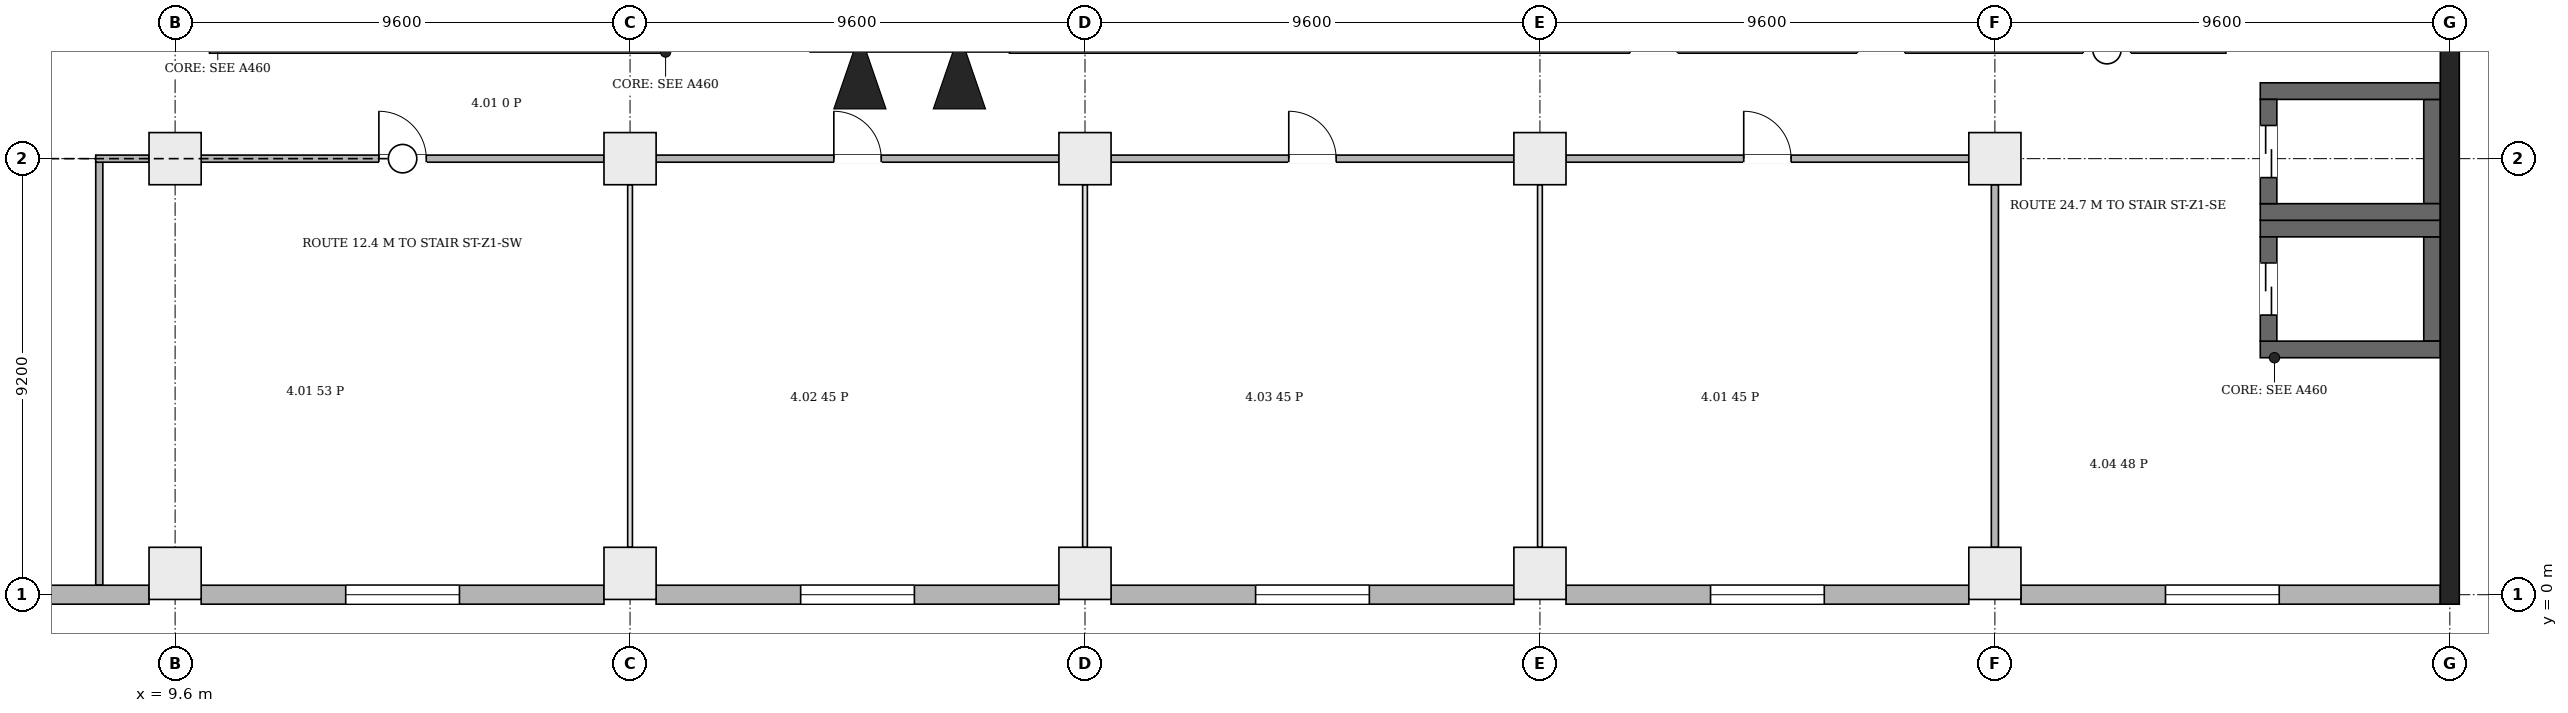
"""IFC4 building model, lengths in metres.
Left out: names, types, materials, properties, quantities, classifications, styles, units other than length and angle.
Written with IfcOpenShell. Run it as: python <this file> out.ifc"""

import sys

from ifc_helpers import new_model, si_unit, direction, frame, frame_2d, origin, origin_2d, place, context, subcontext, project, spatial, rectangle, extrude, element, fill, save


model = new_model("IFC4")
c1 = context("Model", 3, precision=1e-05, world=origin(), true_north=direction((0.0, 1.0)))
c2 = subcontext(c1, "Body", "Model", "MODEL_VIEW")
j1 = project(units=[si_unit("LENGTHUNIT", "METRE"), si_unit("PLANEANGLEUNIT", "RADIAN")], contexts=[c1])
p1 = place(None, origin())
s1 = spatial("IfcSite", under=j1, at=p1, CompositionType="ELEMENT")
p2 = place(p1, origin())
s2 = spatial("IfcBuilding", under=s1, at=p2, CompositionType="ELEMENT")
p3 = place(p2, frame((0.0, 0.0, 26.7)))
s3 = spatial("IfcBuildingStorey", under=s2, at=p3, CompositionType="ELEMENT", Elevation=26.7)
p4 = place(p3, frame((57.6, -0.2, 0.0), z_axis=(0.0, 0.0, 1.0), x_axis=(0.0, 1.0, 0.0)))
e1 = element("IfcWall", 1, at=p4, inside=s3, PredefinedType="SHEAR", context=c2, shape_type="SweptSolid", body=[
    extrude(rectangle(XDim=46.88, YDim=0.4, at=frame_2d((23.44, 0.0))), origin(), (0.0, 0.0, 1.0), 5.2),
])
for number, where, z_axis, x_axis in (
    (2, (53.6, 5.175, 0.0), (0.0, 0.0, 1.0), (1.0, 0.0, 0.0)),
    (3, (53.6, 7.725, 0.0), (0.0, 0.0, 1.0), (1.0, 0.0, 0.0)),
):
    element("IfcWall", number, at=place(p3, frame(where, z_axis=z_axis, x_axis=x_axis)), inside=s3, PredefinedType="SHEAR", context=c2, shape_type="SweptSolid", body=[
        extrude(rectangle(XDim=3.8, YDim=0.35, at=frame_2d((1.9, 0.0))), origin(), (0.0, 0.0, 1.0), 5.2),
    ])
p5 = place(p3, frame((53.775, 5.35, 0.0), z_axis=(0.0, 0.0, 1.0), x_axis=(0.0, 1.0, 0.0)))
e4 = element("IfcWall", 4, at=p5, inside=s3, PredefinedType="SHEAR", context=c2, shape_type="SweptSolid", body=[
    extrude(rectangle(XDim=2.2, YDim=0.35, at=frame_2d((1.1, 0.0))), origin(), (0.0, 0.0, 1.0), 5.2),
])
p6 = place(p5, frame((0.55, 0.0, 0.0)))
e5 = element("IfcOpeningElement", 5, at=p6, cuts=e4, PredefinedType="OPENING", context=c2, shape_type="SweptSolid", body=[
    extrude(rectangle(XDim=1.1, YDim=2.1, at=frame_2d((0.55, 1.05))), frame((0.0, 0.185, 0.0), z_axis=(0.0, -1.0, 0.0), x_axis=(1.0, 0.0, 0.0)), (0.0, 0.0, 1.0), 0.37),
])
p7 = place(p3, frame((57.225, 5.35, 0.0), z_axis=(0.0, 0.0, 1.0), x_axis=(0.0, 1.0, 0.0)))
e6 = element("IfcWall", 6, at=p7, inside=s3, PredefinedType="SHEAR", context=c2, shape_type="SweptSolid", body=[
    extrude(rectangle(XDim=2.2, YDim=0.35, at=frame_2d((1.1, 0.0))), origin(), (0.0, 0.0, 1.0), 5.2),
])
for number, where, z_axis, x_axis in (
    (7, (53.6, 8.075, 0.0), (0.0, 0.0, 1.0), (1.0, 0.0, 0.0)),
    (8, (53.6, 10.625, 0.0), (0.0, 0.0, 1.0), (1.0, 0.0, 0.0)),
):
    element("IfcWall", number, at=place(p3, frame(where, z_axis=z_axis, x_axis=x_axis)), inside=s3, PredefinedType="SHEAR", context=c2, shape_type="SweptSolid", body=[
        extrude(rectangle(XDim=3.8, YDim=0.35, at=frame_2d((1.9, 0.0))), origin(), (0.0, 0.0, 1.0), 5.2),
    ])
p8 = place(p3, frame((53.775, 8.25, 0.0), z_axis=(0.0, 0.0, 1.0), x_axis=(0.0, 1.0, 0.0)))
e9 = element("IfcWall", 9, at=p8, inside=s3, PredefinedType="SHEAR", context=c2, shape_type="SweptSolid", body=[
    extrude(rectangle(XDim=2.2, YDim=0.35, at=frame_2d((1.1, 0.0))), origin(), (0.0, 0.0, 1.0), 5.2),
])
p9 = place(p8, frame((0.55, 0.0, 0.0)))
e10 = element("IfcOpeningElement", 10, at=p9, cuts=e9, PredefinedType="OPENING", context=c2, shape_type="SweptSolid", body=[
    extrude(rectangle(XDim=1.1, YDim=2.1, at=frame_2d((0.55, 1.05))), frame((0.0, 0.185, 0.0), z_axis=(0.0, -1.0, 0.0), x_axis=(1.0, 0.0, 0.0)), (0.0, 0.0, 1.0), 0.37),
])
p10 = place(p3, frame((57.225, 8.25, 0.0), z_axis=(0.0, 0.0, 1.0), x_axis=(0.0, 1.0, 0.0)))
e11 = element("IfcWall", 11, at=p10, inside=s3, PredefinedType="SHEAR", context=c2, shape_type="SweptSolid", body=[
    extrude(rectangle(XDim=2.2, YDim=0.35, at=frame_2d((1.1, 0.0))), origin(), (0.0, 0.0, 1.0), 5.2),
])
for number, where, z_axis, x_axis in (
    (12, (9.6, 0.45, 0.0), (0.0, 0.0, 1.0), (1.0, 0.0, 0.0)),
    (13, (19.2, 0.45, 0.0), (0.0, 0.0, 1.0), (1.0, 0.0, 0.0)),
    (14, (28.8, 0.45, 0.0), (0.0, 0.0, 1.0), (1.0, 0.0, 0.0)),
    (15, (38.4, 0.45, 0.0), (0.0, 0.0, 1.0), (1.0, 0.0, 0.0)),
    (16, (48.0, 0.45, 0.0), (0.0, 0.0, 1.0), (1.0, 0.0, 0.0)),
    (17, (9.6, 9.2, 0.0), (0.0, 0.0, 1.0), (1.0, 0.0, 0.0)),
    (18, (19.2, 9.2, 0.0), (0.0, 0.0, 1.0), (1.0, 0.0, 0.0)),
    (19, (28.8, 9.2, 0.0), (0.0, 0.0, 1.0), (1.0, 0.0, 0.0)),
    (20, (38.4, 9.2, 0.0), (0.0, 0.0, 1.0), (1.0, 0.0, 0.0)),
    (21, (48.0, 9.2, 0.0), (0.0, 0.0, 1.0), (1.0, 0.0, 0.0)),
):
    element("IfcColumn", number, at=place(p3, frame(where, z_axis=z_axis, x_axis=x_axis)), inside=s3, PredefinedType="COLUMN", context=c2, shape_type="SweptSolid", body=[
        extrude(rectangle(XDim=1.1, YDim=1.1, at=origin_2d()), origin(), (0.0, 0.0, 1.0), 5.2),
    ])
p11 = place(p3, frame((0.2, 0.0, 0.0), z_axis=(0.0, 0.0, 1.0), x_axis=(1.0, 0.0, 0.0)))
e22 = element("IfcWall", 22, at=p11, inside=s3, PredefinedType="ELEMENTEDWALL", context=c2, shape_type="SweptSolid", body=[
    extrude(rectangle(XDim=8.85, YDim=0.4, at=frame_2d((4.425, 0.0))), origin(), (0.0, 0.0, 1.0), 4.85),
])
p12 = place(p11, frame((3.4, 0.0, 1.0)))
e23 = element("IfcOpeningElement", 23, at=p12, cuts=e22, PredefinedType="OPENING", context=c2, shape_type="SweptSolid", body=[
    extrude(rectangle(XDim=2.4, YDim=2.2, at=frame_2d((1.2, 1.1))), frame((0.0, 0.21, 0.0), z_axis=(0.0, -1.0, 0.0), x_axis=(1.0, 0.0, 0.0)), (0.0, 0.0, 1.0), 0.42),
])
p13 = place(p3, frame((10.15, 0.0, 0.0), z_axis=(0.0, 0.0, 1.0), x_axis=(1.0, 0.0, 0.0)))
e24 = element("IfcWall", 24, at=p13, inside=s3, PredefinedType="ELEMENTEDWALL", context=c2, shape_type="SweptSolid", body=[
    extrude(rectangle(XDim=8.5, YDim=0.4, at=frame_2d((4.25, 0.0))), origin(), (0.0, 0.0, 1.0), 4.85),
])
p14 = place(p13, frame((3.05, 0.0, 1.0)))
e25 = element("IfcOpeningElement", 25, at=p14, cuts=e24, PredefinedType="OPENING", context=c2, shape_type="SweptSolid", body=[
    extrude(rectangle(XDim=2.4, YDim=2.2, at=frame_2d((1.2, 1.1))), frame((0.0, 0.21, 0.0), z_axis=(0.0, -1.0, 0.0), x_axis=(1.0, 0.0, 0.0)), (0.0, 0.0, 1.0), 0.42),
])
p15 = place(p3, frame((19.75, 0.0, 0.0), z_axis=(0.0, 0.0, 1.0), x_axis=(1.0, 0.0, 0.0)))
e26 = element("IfcWall", 26, at=p15, inside=s3, PredefinedType="ELEMENTEDWALL", context=c2, shape_type="SweptSolid", body=[
    extrude(rectangle(XDim=8.5, YDim=0.4, at=frame_2d((4.25, 0.0))), origin(), (0.0, 0.0, 1.0), 4.85),
])
p16 = place(p15, frame((3.05, 0.0, 1.0)))
e27 = element("IfcOpeningElement", 27, at=p16, cuts=e26, PredefinedType="OPENING", context=c2, shape_type="SweptSolid", body=[
    extrude(rectangle(XDim=2.4, YDim=2.2, at=frame_2d((1.2, 1.1))), frame((0.0, 0.21, 0.0), z_axis=(0.0, -1.0, 0.0), x_axis=(1.0, 0.0, 0.0)), (0.0, 0.0, 1.0), 0.42),
])
p17 = place(p3, frame((29.35, 0.0, 0.0), z_axis=(0.0, 0.0, 1.0), x_axis=(1.0, 0.0, 0.0)))
e28 = element("IfcWall", 28, at=p17, inside=s3, PredefinedType="ELEMENTEDWALL", context=c2, shape_type="SweptSolid", body=[
    extrude(rectangle(XDim=8.5, YDim=0.4, at=frame_2d((4.25, 0.0))), origin(), (0.0, 0.0, 1.0), 4.85),
])
p18 = place(p17, frame((3.05, 0.0, 1.0)))
e29 = element("IfcOpeningElement", 29, at=p18, cuts=e28, PredefinedType="OPENING", context=c2, shape_type="SweptSolid", body=[
    extrude(rectangle(XDim=2.4, YDim=2.2, at=frame_2d((1.2, 1.1))), frame((0.0, 0.21, 0.0), z_axis=(0.0, -1.0, 0.0), x_axis=(1.0, 0.0, 0.0)), (0.0, 0.0, 1.0), 0.42),
])
p19 = place(p3, frame((38.95, 0.0, 0.0), z_axis=(0.0, 0.0, 1.0), x_axis=(1.0, 0.0, 0.0)))
e30 = element("IfcWall", 30, at=p19, inside=s3, PredefinedType="ELEMENTEDWALL", context=c2, shape_type="SweptSolid", body=[
    extrude(rectangle(XDim=8.5, YDim=0.4, at=frame_2d((4.25, 0.0))), origin(), (0.0, 0.0, 1.0), 4.85),
])
p20 = place(p19, frame((3.05, 0.0, 1.0)))
e31 = element("IfcOpeningElement", 31, at=p20, cuts=e30, PredefinedType="OPENING", context=c2, shape_type="SweptSolid", body=[
    extrude(rectangle(XDim=2.4, YDim=2.2, at=frame_2d((1.2, 1.1))), frame((0.0, 0.21, 0.0), z_axis=(0.0, -1.0, 0.0), x_axis=(1.0, 0.0, 0.0)), (0.0, 0.0, 1.0), 0.42),
])
p21 = place(p3, frame((48.55, 0.0, 0.0), z_axis=(0.0, 0.0, 1.0), x_axis=(1.0, 0.0, 0.0)))
e32 = element("IfcWall", 32, at=p21, inside=s3, PredefinedType="ELEMENTEDWALL", context=c2, shape_type="SweptSolid", body=[
    extrude(rectangle(XDim=8.85, YDim=0.4, at=frame_2d((4.425, 0.0))), origin(), (0.0, 0.0, 1.0), 4.85),
])
p22 = place(p21, frame((3.05, 0.0, 1.0)))
e33 = element("IfcOpeningElement", 33, at=p22, cuts=e32, PredefinedType="OPENING", context=c2, shape_type="SweptSolid", body=[
    extrude(rectangle(XDim=2.4, YDim=2.2, at=frame_2d((1.2, 1.1))), frame((0.0, 0.21, 0.0), z_axis=(0.0, -1.0, 0.0), x_axis=(1.0, 0.0, 0.0)), (0.0, 0.0, 1.0), 0.42),
])
p23 = place(p3, frame((8.0, 0.206, 0.0), z_axis=(0.0, 0.0, 1.0), x_axis=(0.0, 1.0, 0.0)))
e34 = element("IfcWall", 34, at=p23, inside=s3, PredefinedType="PARTITIONING", context=c2, shape_type="SweptSolid", body=[
    extrude(rectangle(XDim=8.919, YDim=0.15, at=frame_2d((4.459, 0.0))), origin(), (0.0, 0.0, 1.0), 4.85),
])
p24 = place(p3, frame((7.925, 9.2, 0.0), z_axis=(0.0, 0.0, 1.0), x_axis=(1.0, 0.0, 0.0)))
e35 = element("IfcWall", 35, at=p24, inside=s3, PredefinedType="PARTITIONING", context=c2, shape_type="SweptSolid", body=[
    extrude(rectangle(XDim=1.125, YDim=0.15, at=frame_2d((0.562, 0.0))), origin(), (0.0, 0.0, 1.0), 4.45),
])
p25 = place(p3, frame((10.15, 9.2, 0.0), z_axis=(0.0, 0.0, 1.0), x_axis=(1.0, 0.0, 0.0)))
e36 = element("IfcWall", 36, at=p25, inside=s3, PredefinedType="PARTITIONING", context=c2, shape_type="SweptSolid", body=[
    extrude(rectangle(XDim=8.5, YDim=0.15, at=frame_2d((4.25, 0.0))), origin(), (0.0, 0.0, 1.0), 4.45),
])
p26 = place(p25, frame((3.75, 0.0, 0.0)))
e37 = element("IfcOpeningElement", 37, at=p26, cuts=e36, PredefinedType="OPENING", context=c2, shape_type="SweptSolid", body=[
    extrude(rectangle(XDim=1.0, YDim=2.1, at=frame_2d((0.5, 1.05))), frame((0.0, 0.085, 0.0), z_axis=(0.0, -1.0, 0.0), x_axis=(1.0, 0.0, 0.0)), (0.0, 0.0, 1.0), 0.17),
])
p27 = place(p3, frame((10.325, 11.5, 0.0), z_axis=(0.0, 0.0, 1.0), x_axis=(1.0, 0.0, 0.0)))
e38 = element("IfcWall", 38, at=p27, inside=s3, PredefinedType="PARTITIONING", context=c2, shape_type="SweptSolid", body=[
    extrude(rectangle(XDim=9.569, YDim=0.15, at=frame_2d((4.785, 0.0))), origin(), (0.0, 0.0, 1.0), 4.85),
])
p28 = place(p3, frame((19.2, 1.0, 0.0), z_axis=(0.0, 0.0, 1.0), x_axis=(0.0, 1.0, 0.0)))
e39 = element("IfcWall", 39, at=p28, inside=s3, PredefinedType="PARTITIONING", context=c2, shape_type="SweptSolid", body=[
    extrude(rectangle(XDim=7.65, YDim=0.1, at=frame_2d((3.825, 0.0))), origin(), (0.0, 0.0, 1.0), 4.45),
])
p29 = place(p3, frame((19.75, 9.2, 0.0), z_axis=(0.0, 0.0, 1.0), x_axis=(1.0, 0.0, 0.0)))
e40 = element("IfcWall", 40, at=p29, inside=s3, PredefinedType="PARTITIONING", context=c2, shape_type="SweptSolid", body=[
    extrude(rectangle(XDim=8.5, YDim=0.15, at=frame_2d((4.25, 0.0))), origin(), (0.0, 0.0, 1.0), 4.45),
])
p30 = place(p29, frame((3.75, 0.0, 0.0)))
e41 = element("IfcOpeningElement", 41, at=p30, cuts=e40, PredefinedType="OPENING", context=c2, shape_type="SweptSolid", body=[
    extrude(rectangle(XDim=1.0, YDim=2.1, at=frame_2d((0.5, 1.05))), frame((0.0, 0.085, 0.0), z_axis=(0.0, -1.0, 0.0), x_axis=(1.0, 0.0, 0.0)), (0.0, 0.0, 1.0), 0.17),
])
p31 = place(p3, frame((27.206, 11.5, 0.0), z_axis=(0.0, 0.0, 1.0), x_axis=(1.0, 0.0, 0.0)))
e42 = element("IfcWall", 42, at=p31, inside=s3, PredefinedType="PARTITIONING", context=c2, shape_type="SweptSolid", body=[
    extrude(rectangle(XDim=25.669, YDim=0.15, at=frame_2d((12.834, 0.0))), origin(), (0.0, 0.0, 1.0), 4.85),
])
p32 = place(p31, frame((13.094, 0.0, 0.0)))
e43 = element("IfcOpeningElement", 43, at=p32, cuts=e42, PredefinedType="OPENING", context=c2, shape_type="SweptSolid", body=[
    extrude(rectangle(XDim=1.0, YDim=2.1, at=frame_2d((0.5, 1.05))), frame((0.0, 0.085, 0.0), z_axis=(0.0, -1.0, 0.0), x_axis=(1.0, 0.0, 0.0)), (0.0, 0.0, 1.0), 0.17),
])
p33 = place(p31, frame((17.894, 0.0, 0.0)))
e44 = element("IfcOpeningElement", 44, at=p33, cuts=e42, PredefinedType="OPENING", context=c2, shape_type="SweptSolid", body=[
    extrude(rectangle(XDim=1.0, YDim=2.1, at=frame_2d((0.5, 1.05))), frame((0.0, 0.085, 0.0), z_axis=(0.0, -1.0, 0.0), x_axis=(1.0, 0.0, 0.0)), (0.0, 0.0, 1.0), 0.17),
])
p34 = place(p31, frame((22.659, 0.0, 0.0)))
e45 = element("IfcOpeningElement", 45, at=p34, cuts=e42, PredefinedType="OPENING", context=c2, shape_type="SweptSolid", body=[
    extrude(rectangle(XDim=1.0, YDim=2.1, at=frame_2d((0.5, 1.05))), frame((0.0, 0.085, 0.0), z_axis=(0.0, -1.0, 0.0), x_axis=(1.0, 0.0, 0.0)), (0.0, 0.0, 1.0), 0.17),
])
p35 = place(p3, frame((28.8, 1.0, 0.0), z_axis=(0.0, 0.0, 1.0), x_axis=(0.0, 1.0, 0.0)))
e46 = element("IfcWall", 46, at=p35, inside=s3, PredefinedType="PARTITIONING", context=c2, shape_type="SweptSolid", body=[
    extrude(rectangle(XDim=7.65, YDim=0.1, at=frame_2d((3.825, 0.0))), origin(), (0.0, 0.0, 1.0), 4.45),
])
p36 = place(p3, frame((29.35, 9.2, 0.0), z_axis=(0.0, 0.0, 1.0), x_axis=(1.0, 0.0, 0.0)))
e47 = element("IfcWall", 47, at=p36, inside=s3, PredefinedType="PARTITIONING", context=c2, shape_type="SweptSolid", body=[
    extrude(rectangle(XDim=8.5, YDim=0.15, at=frame_2d((4.25, 0.0))), origin(), (0.0, 0.0, 1.0), 4.45),
])
p37 = place(p36, frame((3.75, 0.0, 0.0)))
e48 = element("IfcOpeningElement", 48, at=p37, cuts=e47, PredefinedType="OPENING", context=c2, shape_type="SweptSolid", body=[
    extrude(rectangle(XDim=1.0, YDim=2.1, at=frame_2d((0.5, 1.05))), frame((0.0, 0.085, 0.0), z_axis=(0.0, -1.0, 0.0), x_axis=(1.0, 0.0, 0.0)), (0.0, 0.0, 1.0), 0.17),
])
p38 = place(p3, frame((38.4, 1.0, 0.0), z_axis=(0.0, 0.0, 1.0), x_axis=(0.0, 1.0, 0.0)))
e49 = element("IfcWall", 49, at=p38, inside=s3, PredefinedType="PARTITIONING", context=c2, shape_type="SweptSolid", body=[
    extrude(rectangle(XDim=7.65, YDim=0.1, at=frame_2d((3.825, 0.0))), origin(), (0.0, 0.0, 1.0), 4.45),
])
p39 = place(p3, frame((38.95, 9.2, 0.0), z_axis=(0.0, 0.0, 1.0), x_axis=(1.0, 0.0, 0.0)))
e50 = element("IfcWall", 50, at=p39, inside=s3, PredefinedType="PARTITIONING", context=c2, shape_type="SweptSolid", body=[
    extrude(rectangle(XDim=8.5, YDim=0.15, at=frame_2d((4.25, 0.0))), origin(), (0.0, 0.0, 1.0), 4.45),
])
p40 = place(p39, frame((3.75, 0.0, 0.0)))
e51 = element("IfcOpeningElement", 51, at=p40, cuts=e50, PredefinedType="OPENING", context=c2, shape_type="SweptSolid", body=[
    extrude(rectangle(XDim=1.0, YDim=2.1, at=frame_2d((0.5, 1.05))), frame((0.0, 0.085, 0.0), z_axis=(0.0, -1.0, 0.0), x_axis=(1.0, 0.0, 0.0)), (0.0, 0.0, 1.0), 0.17),
])
p41 = place(p3, frame((48.0, 1.0, 0.0), z_axis=(0.0, 0.0, 1.0), x_axis=(0.0, 1.0, 0.0)))
e52 = element("IfcWall", 52, at=p41, inside=s3, PredefinedType="PARTITIONING", context=c2, shape_type="SweptSolid", body=[
    extrude(rectangle(XDim=7.65, YDim=0.15, at=frame_2d((3.825, 0.0))), origin(), (0.0, 0.0, 1.0), 4.85),
])
p42 = place(p14, origin())
e53 = element("IfcWindow", 53, at=p42, inside=s3, PartitioningType="SINGLE_PANEL", PredefinedType="WINDOW", context=c2, shape_type="SweptSolid", body=[
    extrude(rectangle(XDim=2.4, YDim=2.2, at=frame_2d((1.2, 1.1))), frame((0.0, 0.03, 0.0), z_axis=(0.0, -1.0, 0.0), x_axis=(1.0, 0.0, 0.0)), (0.0, 0.0, 1.0), 0.06),
])
fill(e25, e53)
p43 = place(p16, origin())
e54 = element("IfcWindow", 54, at=p43, inside=s3, PartitioningType="SINGLE_PANEL", PredefinedType="WINDOW", context=c2, shape_type="SweptSolid", body=[
    extrude(rectangle(XDim=2.4, YDim=2.2, at=frame_2d((1.2, 1.1))), frame((0.0, 0.03, 0.0), z_axis=(0.0, -1.0, 0.0), x_axis=(1.0, 0.0, 0.0)), (0.0, 0.0, 1.0), 0.06),
])
fill(e27, e54)
p44 = place(p18, origin())
e55 = element("IfcWindow", 55, at=p44, inside=s3, PartitioningType="SINGLE_PANEL", PredefinedType="WINDOW", context=c2, shape_type="SweptSolid", body=[
    extrude(rectangle(XDim=2.4, YDim=2.2, at=frame_2d((1.2, 1.1))), frame((0.0, 0.03, 0.0), z_axis=(0.0, -1.0, 0.0), x_axis=(1.0, 0.0, 0.0)), (0.0, 0.0, 1.0), 0.06),
])
fill(e29, e55)
p45 = place(p20, origin())
e56 = element("IfcWindow", 56, at=p45, inside=s3, PartitioningType="SINGLE_PANEL", PredefinedType="WINDOW", context=c2, shape_type="SweptSolid", body=[
    extrude(rectangle(XDim=2.4, YDim=2.2, at=frame_2d((1.2, 1.1))), frame((0.0, 0.03, 0.0), z_axis=(0.0, -1.0, 0.0), x_axis=(1.0, 0.0, 0.0)), (0.0, 0.0, 1.0), 0.06),
])
fill(e31, e56)
p46 = place(p22, origin())
e57 = element("IfcWindow", 57, at=p46, inside=s3, PartitioningType="SINGLE_PANEL", PredefinedType="WINDOW", context=c2, shape_type="SweptSolid", body=[
    extrude(rectangle(XDim=2.4, YDim=2.2, at=frame_2d((1.2, 1.1))), frame((0.0, 0.03, 0.0), z_axis=(0.0, -1.0, 0.0), x_axis=(1.0, 0.0, 0.0)), (0.0, 0.0, 1.0), 0.06),
])
fill(e33, e57)
p47 = place(p6, origin())
e58 = element("IfcDoor", 58, at=p47, inside=s3, OperationType="DOUBLE_DOOR_SLIDING", PredefinedType="DOOR", context=c2, shape_type="SweptSolid", body=[
    extrude(rectangle(XDim=1.1, YDim=2.1, at=frame_2d((0.55, 1.05))), frame((0.0, 0.025, 0.0), z_axis=(0.0, -1.0, 0.0), x_axis=(1.0, 0.0, 0.0)), (0.0, 0.0, 1.0), 0.05),
])
fill(e5, e58)
p48 = place(p9, origin())
e59 = element("IfcDoor", 59, at=p48, inside=s3, OperationType="DOUBLE_DOOR_SLIDING", PredefinedType="DOOR", context=c2, shape_type="SweptSolid", body=[
    extrude(rectangle(XDim=1.1, YDim=2.1, at=frame_2d((0.55, 1.05))), frame((0.0, 0.025, 0.0), z_axis=(0.0, -1.0, 0.0), x_axis=(1.0, 0.0, 0.0)), (0.0, 0.0, 1.0), 0.05),
])
fill(e10, e59)
p49 = place(p26, origin())
e60 = element("IfcDoor", 60, at=p49, inside=s3, OperationType="SINGLE_SWING_RIGHT", PredefinedType="DOOR", context=c2, shape_type="SweptSolid", body=[
    extrude(rectangle(XDim=1.0, YDim=2.1, at=frame_2d((0.5, 1.05))), frame((0.0, 0.025, 0.0), z_axis=(0.0, -1.0, 0.0), x_axis=(1.0, 0.0, 0.0)), (0.0, 0.0, 1.0), 0.05),
])
fill(e37, e60)
p50 = place(p30, origin())
e61 = element("IfcDoor", 61, at=p50, inside=s3, OperationType="SINGLE_SWING_RIGHT", PredefinedType="DOOR", context=c2, shape_type="SweptSolid", body=[
    extrude(rectangle(XDim=1.0, YDim=2.1, at=frame_2d((0.5, 1.05))), frame((0.0, 0.025, 0.0), z_axis=(0.0, -1.0, 0.0), x_axis=(1.0, 0.0, 0.0)), (0.0, 0.0, 1.0), 0.05),
])
fill(e41, e61)
p51 = place(p37, origin())
e62 = element("IfcDoor", 62, at=p51, inside=s3, OperationType="SINGLE_SWING_RIGHT", PredefinedType="DOOR", context=c2, shape_type="SweptSolid", body=[
    extrude(rectangle(XDim=1.0, YDim=2.1, at=frame_2d((0.5, 1.05))), frame((0.0, 0.025, 0.0), z_axis=(0.0, -1.0, 0.0), x_axis=(1.0, 0.0, 0.0)), (0.0, 0.0, 1.0), 0.05),
])
fill(e48, e62)
p52 = place(p40, origin())
e63 = element("IfcDoor", 63, at=p52, inside=s3, OperationType="SINGLE_SWING_LEFT", PredefinedType="DOOR", context=c2, shape_type="SweptSolid", body=[
    extrude(rectangle(XDim=1.0, YDim=2.1, at=frame_2d((0.5, 1.05))), frame((0.0, 0.025, 0.0), z_axis=(0.0, -1.0, 0.0), x_axis=(1.0, 0.0, 0.0)), (0.0, 0.0, 1.0), 0.05),
])
fill(e51, e63)
save(model, sys.argv[1])
